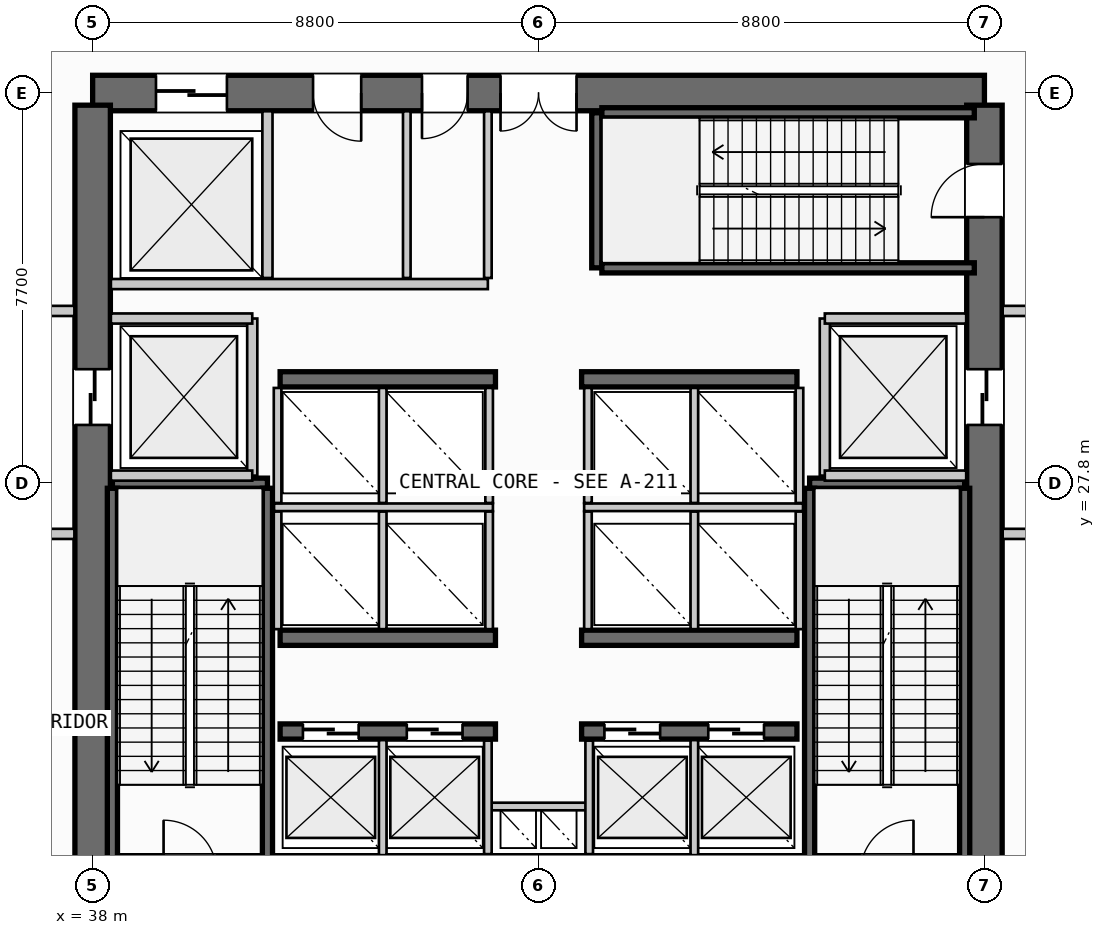
"""IFC4 building model, lengths in metres.
Left out: names, types, materials, properties, quantities, classifications, styles, units other than length and angle.
Written with IfcOpenShell. Run it as: python <this file> out.ifc"""

import sys

from ifc_helpers import new_model, si_unit, direction, frame, frame_2d, origin, place, context, subcontext, project, spatial, rectangle, extrude, source, transform, mapped, element, fill, save


model = new_model("IFC4")
c1 = context("Model", 3, precision=1e-05, world=origin(), true_north=direction((0.0, 1.0)))
c2 = subcontext(c1, "Body", "Model", "MODEL_VIEW")
j1 = project(units=[si_unit("LENGTHUNIT", "METRE"), si_unit("PLANEANGLEUNIT", "RADIAN")], contexts=[c1])
p1 = place(None, origin())
s1 = spatial("IfcSite", under=j1, at=p1, CompositionType="ELEMENT")
p2 = place(p1, origin())
s2 = spatial("IfcBuilding", under=s1, at=p2, CompositionType="ELEMENT")
p3 = place(p2, frame((0.0, 0.0, 75.2)))
s3 = spatial("IfcBuildingStorey", under=s2, at=p3, CompositionType="ELEMENT", Elevation=75.2)
p4 = place(p3, frame((38.0, 20.1, 0.0), z_axis=(0.0, 0.0, 1.0), x_axis=(1.0, 0.0, 0.0)))
e1 = element("IfcWall", 1, at=p4, inside=s3, PredefinedType="SHEAR", context=c2, shape_type="SweptSolid", body=[
    extrude(rectangle(XDim=17.6, YDim=0.7, at=frame_2d((8.8, 0.0))), origin(), (0.0, 0.0, 1.0), 4.89),
])
p5 = place(p4, frame((1.4, 0.0, 0.0)))
e2 = element("IfcOpeningElement", 2, at=p5, cuts=e1, PredefinedType="OPENING", context=c2, shape_type="SweptSolid", body=[
    extrude(rectangle(XDim=1.05, YDim=2.15, at=frame_2d((0.525, 1.075))), frame((0.0, 0.36, 0.0), z_axis=(0.0, -1.0, 0.0), x_axis=(1.0, 0.0, 0.0)), (0.0, 0.0, 1.0), 0.72),
])
p6 = place(p4, frame((15.15, 0.0, 0.0)))
e3 = element("IfcOpeningElement", 3, at=p6, cuts=e1, PredefinedType="OPENING", context=c2, shape_type="SweptSolid", body=[
    extrude(rectangle(XDim=1.05, YDim=2.15, at=frame_2d((0.525, 1.075))), frame((0.0, 0.36, 0.0), z_axis=(0.0, -1.0, 0.0), x_axis=(1.0, 0.0, 0.0)), (0.0, 0.0, 1.0), 0.72),
])
p7 = place(p3, frame((55.6, 35.5, 0.0), z_axis=(0.0, 0.0, 1.0), x_axis=(-1.0, 0.0, 0.0)))
e4 = element("IfcWall", 4, at=p7, inside=s3, PredefinedType="SHEAR", context=c2, shape_type="SweptSolid", body=[
    extrude(rectangle(XDim=17.6, YDim=0.7, at=frame_2d((8.8, 0.0))), origin(), (0.0, 0.0, 1.0), 4.89),
])
p8 = place(p7, frame((8.05, 0.0, 0.0)))
e5 = element("IfcOpeningElement", 5, at=p8, cuts=e4, PredefinedType="OPENING", context=c2, shape_type="SweptSolid", body=[
    extrude(rectangle(XDim=1.5, YDim=2.2, at=frame_2d((0.75, 1.1))), frame((0.0, 0.36, 0.0), z_axis=(0.0, -1.0, 0.0), x_axis=(1.0, 0.0, 0.0)), (0.0, 0.0, 1.0), 0.72),
])
p9 = place(p7, frame((14.95, 0.0, 0.0)))
e6 = element("IfcOpeningElement", 6, at=p9, cuts=e4, PredefinedType="OPENING", context=c2, shape_type="SweptSolid", body=[
    extrude(rectangle(XDim=1.4, YDim=2.3, at=frame_2d((0.7, 1.15))), frame((0.0, 0.36, 0.0), z_axis=(0.0, -1.0, 0.0), x_axis=(1.0, 0.0, 0.0)), (0.0, 0.0, 1.0), 0.72),
])
p10 = place(p7, frame((12.3, 0.0, 0.0)))
e7 = element("IfcOpeningElement", 7, at=p10, cuts=e4, PredefinedType="OPENING", context=c2, shape_type="SweptSolid", body=[
    extrude(rectangle(XDim=0.95, YDim=2.15, at=frame_2d((0.475, 1.075))), frame((0.0, 0.36, 0.0), z_axis=(0.0, -1.0, 0.0), x_axis=(1.0, 0.0, 0.0)), (0.0, 0.0, 1.0), 0.72),
])
p11 = place(p7, frame((10.2, 0.0, 0.0)))
e8 = element("IfcOpeningElement", 8, at=p11, cuts=e4, PredefinedType="OPENING", context=c2, shape_type="SweptSolid", body=[
    extrude(rectangle(XDim=0.9, YDim=2.15, at=frame_2d((0.45, 1.075))), frame((0.0, 0.36, 0.0), z_axis=(0.0, -1.0, 0.0), x_axis=(1.0, 0.0, 0.0)), (0.0, 0.0, 1.0), 0.72),
])
p12 = place(p3, frame((38.0, 35.26, 0.0), z_axis=(0.0, 0.0, 1.0), x_axis=(0.0, -1.0, 0.0)))
e9 = element("IfcWall", 9, at=p12, inside=s3, PredefinedType="SHEAR", context=c2, shape_type="SweptSolid", body=[
    extrude(rectangle(XDim=14.92, YDim=0.7, at=frame_2d((7.46, 0.0))), origin(), (0.0, 0.0, 1.0), 4.89),
])
p13 = place(p12, frame((5.21, 0.0, 0.0)))
e10 = element("IfcOpeningElement", 10, at=p13, cuts=e9, PredefinedType="OPENING", context=c2, shape_type="SweptSolid", body=[
    extrude(rectangle(XDim=1.1, YDim=2.2, at=frame_2d((0.55, 1.1))), frame((0.0, 0.36, 0.0), z_axis=(0.0, -1.0, 0.0), x_axis=(1.0, 0.0, 0.0)), (0.0, 0.0, 1.0), 0.72),
])
p14 = place(p3, frame((55.6, 20.34, 0.0), z_axis=(0.0, 0.0, 1.0), x_axis=(0.0, 1.0, 0.0)))
e11 = element("IfcWall", 11, at=p14, inside=s3, PredefinedType="SHEAR", context=c2, shape_type="SweptSolid", body=[
    extrude(rectangle(XDim=14.92, YDim=0.7, at=frame_2d((7.46, 0.0))), origin(), (0.0, 0.0, 1.0), 4.89),
])
p15 = place(p14, frame((12.71, 0.0, 0.0)))
e12 = element("IfcOpeningElement", 12, at=p15, cuts=e11, PredefinedType="OPENING", context=c2, shape_type="SweptSolid", body=[
    extrude(rectangle(XDim=1.05, YDim=2.15, at=frame_2d((0.525, 1.075))), frame((0.0, 0.36, 0.0), z_axis=(0.0, -1.0, 0.0), x_axis=(1.0, 0.0, 0.0)), (0.0, 0.0, 1.0), 0.72),
])
p16 = place(p14, frame((8.61, 0.0, 0.0)))
e13 = element("IfcOpeningElement", 13, at=p16, cuts=e11, PredefinedType="OPENING", context=c2, shape_type="SweptSolid", body=[
    extrude(rectangle(XDim=1.1, YDim=2.2, at=frame_2d((0.55, 1.1))), frame((0.0, 0.36, 0.0), z_axis=(0.0, -1.0, 0.0), x_axis=(1.0, 0.0, 0.0)), (0.0, 0.0, 1.0), 0.72),
])
p17 = place(p3, frame((41.7, 22.9, 0.0), z_axis=(0.0, 0.0, 1.0), x_axis=(1.0, 0.0, 0.0)))
e14 = element("IfcWall", 14, at=p17, inside=s3, PredefinedType="SHEAR", context=c2, shape_type="SweptSolid", body=[
    extrude(rectangle(XDim=4.25, YDim=0.3, at=frame_2d((2.125, 0.0))), origin(), (0.0, 0.0, 1.0), 4.89),
])
p18 = place(p17, frame((0.45, 0.0, 0.0)))
e15 = element("IfcOpeningElement", 15, at=p18, cuts=e14, PredefinedType="OPENING", context=c2, shape_type="SweptSolid", body=[
    extrude(rectangle(XDim=1.1, YDim=2.2, at=frame_2d((0.55, 1.1))), frame((0.0, 0.16, 0.0), z_axis=(0.0, -1.0, 0.0), x_axis=(1.0, 0.0, 0.0)), (0.0, 0.0, 1.0), 0.32),
])
p19 = place(p17, frame((2.5, 0.0, 0.0)))
e16 = element("IfcOpeningElement", 16, at=p19, cuts=e14, PredefinedType="OPENING", context=c2, shape_type="SweptSolid", body=[
    extrude(rectangle(XDim=1.1, YDim=2.2, at=frame_2d((0.55, 1.1))), frame((0.0, 0.16, 0.0), z_axis=(0.0, -1.0, 0.0), x_axis=(1.0, 0.0, 0.0)), (0.0, 0.0, 1.0), 0.32),
])
p20 = place(p3, frame((47.65, 22.9, 0.0), z_axis=(0.0, 0.0, 1.0), x_axis=(1.0, 0.0, 0.0)))
e17 = element("IfcWall", 17, at=p20, inside=s3, PredefinedType="SHEAR", context=c2, shape_type="SweptSolid", body=[
    extrude(rectangle(XDim=4.25, YDim=0.3, at=frame_2d((2.125, 0.0))), origin(), (0.0, 0.0, 1.0), 4.89),
])
p21 = place(p20, frame((0.45, 0.0, 0.0)))
e18 = element("IfcOpeningElement", 18, at=p21, cuts=e17, PredefinedType="OPENING", context=c2, shape_type="SweptSolid", body=[
    extrude(rectangle(XDim=1.1, YDim=2.2, at=frame_2d((0.55, 1.1))), frame((0.0, 0.16, 0.0), z_axis=(0.0, -1.0, 0.0), x_axis=(1.0, 0.0, 0.0)), (0.0, 0.0, 1.0), 0.32),
])
p22 = place(p20, frame((2.5, 0.0, 0.0)))
e19 = element("IfcOpeningElement", 19, at=p22, cuts=e17, PredefinedType="OPENING", context=c2, shape_type="SweptSolid", body=[
    extrude(rectangle(XDim=1.1, YDim=2.2, at=frame_2d((0.55, 1.1))), frame((0.0, 0.16, 0.0), z_axis=(0.0, -1.0, 0.0), x_axis=(1.0, 0.0, 0.0)), (0.0, 0.0, 1.0), 0.32),
])
for number, where, z_axis, x_axis in (
    (20, (41.7, 24.75, 0.0), (0.0, 0.0, 1.0), (1.0, 0.0, 0.0)),
    (21, (47.65, 24.75, 0.0), (0.0, 0.0, 1.0), (1.0, 0.0, 0.0)),
    (22, (41.7, 29.85, 0.0), (0.0, 0.0, 1.0), (1.0, 0.0, 0.0)),
    (23, (47.65, 29.85, 0.0), (0.0, 0.0, 1.0), (1.0, 0.0, 0.0)),
):
    element("IfcWall", number, at=place(p3, frame(where, z_axis=z_axis, x_axis=x_axis)), inside=s3, PredefinedType="SHEAR", context=c2, shape_type="SweptSolid", body=[
        extrude(rectangle(XDim=4.25, YDim=0.3, at=frame_2d((2.125, 0.0))), origin(), (0.0, 0.0, 1.0), 4.89),
    ])
p23 = place(p3, frame((38.39, 27.8, 0.0), z_axis=(0.0, 0.0, 1.0), x_axis=(1.0, 0.0, 0.0)))
e24 = element("IfcWall", 24, at=p23, inside=s3, PredefinedType="SHEAR", context=c2, shape_type="SweptSolid", body=[
    extrude(rectangle(XDim=3.06, YDim=0.2, at=frame_2d((1.53, 0.0))), origin(), (0.0, 0.0, 1.0), 4.89),
])
for number, where, z_axis, x_axis in (
    (25, (41.45, 27.7, 0.0), (0.0, 0.0, 1.0), (0.0, -1.0, 0.0)),
    (26, (38.39, 20.35, 0.0), (0.0, 0.0, 1.0), (0.0, 1.0, 0.0)),
):
    element("IfcWall", number, at=place(p3, frame(where, z_axis=z_axis, x_axis=x_axis)), inside=s3, PredefinedType="SHEAR", context=c2, shape_type="SweptSolid", body=[
        extrude(rectangle(XDim=7.35, YDim=0.2, at=frame_2d((3.675, 0.0))), origin(), (0.0, 0.0, 1.0), 4.89),
    ])
p24 = place(p3, frame((52.15, 27.8, 0.0), z_axis=(0.0, 0.0, 1.0), x_axis=(1.0, 0.0, 0.0)))
e27 = element("IfcWall", 27, at=p24, inside=s3, PredefinedType="SHEAR", context=c2, shape_type="SweptSolid", body=[
    extrude(rectangle(XDim=3.06, YDim=0.2, at=frame_2d((1.53, 0.0))), origin(), (0.0, 0.0, 1.0), 4.89),
])
for number, where, z_axis, x_axis in (
    (28, (55.21, 27.7, 0.0), (0.0, 0.0, 1.0), (0.0, -1.0, 0.0)),
    (29, (52.15, 20.35, 0.0), (0.0, 0.0, 1.0), (0.0, 1.0, 0.0)),
):
    element("IfcWall", number, at=place(p3, frame(where, z_axis=z_axis, x_axis=x_axis)), inside=s3, PredefinedType="SHEAR", context=c2, shape_type="SweptSolid", body=[
        extrude(rectangle(XDim=7.35, YDim=0.2, at=frame_2d((3.675, 0.0))), origin(), (0.0, 0.0, 1.0), 4.89),
    ])
p25 = place(p3, frame((47.95, 32.05, 0.0), z_axis=(0.0, 0.0, 1.0), x_axis=(0.0, 1.0, 0.0)))
e30 = element("IfcWall", 30, at=p25, inside=s3, PredefinedType="SHEAR", context=c2, shape_type="SweptSolid", body=[
    extrude(rectangle(XDim=3.06, YDim=0.2, at=frame_2d((1.53, 0.0))), origin(), (0.0, 0.0, 1.0), 4.89),
])
for number, where, z_axis, x_axis in (
    (31, (48.05, 35.11, 0.0), (0.0, 0.0, 1.0), (1.0, 0.0, 0.0)),
    (32, (55.4, 32.05, 0.0), (0.0, 0.0, 1.0), (-1.0, 0.0, 0.0)),
):
    element("IfcWall", number, at=place(p3, frame(where, z_axis=z_axis, x_axis=x_axis)), inside=s3, PredefinedType="SHEAR", context=c2, shape_type="SweptSolid", body=[
        extrude(rectangle(XDim=7.35, YDim=0.2, at=frame_2d((3.675, 0.0))), origin(), (0.0, 0.0, 1.0), 4.89),
    ])
p26 = place(p3, frame((45.8, 21.42, 0.0), z_axis=(0.0, 0.0, 1.0), x_axis=(1.0, 0.0, 0.0)))
e33 = element("IfcWall", 33, at=p26, inside=s3, PredefinedType="PARTITIONING", context=c2, shape_type="SweptSolid", body=[
    extrude(rectangle(XDim=2.0, YDim=0.15, at=frame_2d((1.0, 0.0))), origin(), (0.0, 0.0, 1.0), 4.265),
])
for number, where, z_axis, x_axis in (
    (34, (45.8, 20.48, 0.0), (0.0, 0.0, 1.0), (0.0, 1.0, 0.0)),
    (35, (47.8, 20.48, 0.0), (0.0, 0.0, 1.0), (0.0, 1.0, 0.0)),
):
    element("IfcWall", number, at=place(p3, frame(where, z_axis=z_axis, x_axis=x_axis)), inside=s3, PredefinedType="PARTITIONING", context=c2, shape_type="SweptSolid", body=[
        extrude(rectangle(XDim=2.24, YDim=0.15, at=frame_2d((1.12, 0.0))), origin(), (0.0, 0.0, 1.0), 4.265),
    ])
p27 = place(p3, frame((41.15, 27.95, 0.0), z_axis=(0.0, 0.0, 1.0), x_axis=(0.0, 1.0, 0.0)))
e36 = element("IfcWall", 36, at=p27, inside=s3, PredefinedType="PARTITIONING", context=c2, shape_type="SweptSolid", body=[
    extrude(rectangle(XDim=3.1, YDim=0.2, at=frame_2d((1.55, 0.0))), origin(), (0.0, 0.0, 1.0), 4.265),
])
for number, where, z_axis, x_axis in (
    (37, (38.36, 27.95, 0.0), (0.0, 0.0, 1.0), (1.0, 0.0, 0.0)),
    (38, (38.36, 31.05, 0.0), (0.0, 0.0, 1.0), (1.0, 0.0, 0.0)),
):
    element("IfcWall", number, at=place(p3, frame(where, z_axis=z_axis, x_axis=x_axis)), inside=s3, PredefinedType="PARTITIONING", context=c2, shape_type="SweptSolid", body=[
        extrude(rectangle(XDim=2.79, YDim=0.2, at=frame_2d((1.395, 0.0))), origin(), (0.0, 0.0, 1.0), 4.265),
    ])
for number, where, z_axis, x_axis in (
    (39, (34.5, 26.8, 0.0), (0.0, 0.0, 1.0), (1.0, 0.0, 0.0)),
    (40, (34.5, 31.2, 0.0), (0.0, 0.0, 1.0), (1.0, 0.0, 0.0)),
):
    element("IfcWall", number, at=place(p3, frame(where, z_axis=z_axis, x_axis=x_axis)), inside=s3, PredefinedType="PARTITIONING", context=c2, shape_type="SweptSolid", body=[
        extrude(rectangle(XDim=3.14, YDim=0.2, at=frame_2d((1.57, 0.0))), origin(), (0.0, 0.0, 1.0), 4.265),
    ])
p28 = place(p3, frame((52.45, 27.95, 0.0), z_axis=(0.0, 0.0, 1.0), x_axis=(0.0, 1.0, 0.0)))
e41 = element("IfcWall", 41, at=p28, inside=s3, PredefinedType="PARTITIONING", context=c2, shape_type="SweptSolid", body=[
    extrude(rectangle(XDim=3.1, YDim=0.2, at=frame_2d((1.55, 0.0))), origin(), (0.0, 0.0, 1.0), 4.265),
])
for number, where, z_axis, x_axis in (
    (42, (52.45, 27.95, 0.0), (0.0, 0.0, 1.0), (1.0, 0.0, 0.0)),
    (43, (52.45, 31.05, 0.0), (0.0, 0.0, 1.0), (1.0, 0.0, 0.0)),
):
    element("IfcWall", number, at=place(p3, frame(where, z_axis=z_axis, x_axis=x_axis)), inside=s3, PredefinedType="PARTITIONING", context=c2, shape_type="SweptSolid", body=[
        extrude(rectangle(XDim=2.79, YDim=0.2, at=frame_2d((1.395, 0.0))), origin(), (0.0, 0.0, 1.0), 4.265),
    ])
for number, where, z_axis, x_axis in (
    (44, (55.96, 26.8, 0.0), (0.0, 0.0, 1.0), (1.0, 0.0, 0.0)),
    (45, (55.96, 31.2, 0.0), (0.0, 0.0, 1.0), (1.0, 0.0, 0.0)),
):
    element("IfcWall", number, at=place(p3, frame(where, z_axis=z_axis, x_axis=x_axis)), inside=s3, PredefinedType="PARTITIONING", context=c2, shape_type="SweptSolid", body=[
        extrude(rectangle(XDim=3.14, YDim=0.2, at=frame_2d((1.57, 0.0))), origin(), (0.0, 0.0, 1.0), 4.265),
    ])
for number, where, z_axis, x_axis in (
    (46, (43.725, 20.46, 0.0), (0.0, 0.0, 1.0), (0.0, 1.0, 0.0)),
    (47, (49.875, 20.46, 0.0), (0.0, 0.0, 1.0), (0.0, 1.0, 0.0)),
):
    element("IfcWall", number, at=place(p3, frame(where, z_axis=z_axis, x_axis=x_axis)), inside=s3, PredefinedType="PARTITIONING", context=c2, shape_type="SweptSolid", body=[
        extrude(rectangle(XDim=2.27, YDim=0.15, at=frame_2d((1.135, 0.0))), origin(), (0.0, 0.0, 1.0), 4.265),
    ])
p29 = place(p3, frame((41.58, 27.325, 0.0), z_axis=(0.0, 0.0, 1.0), x_axis=(1.0, 0.0, 0.0)))
e48 = element("IfcWall", 48, at=p29, inside=s3, PredefinedType="PARTITIONING", context=c2, shape_type="SweptSolid", body=[
    extrude(rectangle(XDim=4.32, YDim=0.15, at=frame_2d((2.16, 0.0))), origin(), (0.0, 0.0, 1.0), 4.265),
])
p30 = place(p3, frame((47.7, 27.325, 0.0), z_axis=(0.0, 0.0, 1.0), x_axis=(1.0, 0.0, 0.0)))
e49 = element("IfcWall", 49, at=p30, inside=s3, PredefinedType="PARTITIONING", context=c2, shape_type="SweptSolid", body=[
    extrude(rectangle(XDim=4.32, YDim=0.15, at=frame_2d((2.16, 0.0))), origin(), (0.0, 0.0, 1.0), 4.265),
])
for number, where, z_axis, x_axis in (
    (50, (41.65, 24.92, 0.0), (0.0, 0.0, 1.0), (0.0, 1.0, 0.0)),
    (51, (43.725, 24.92, 0.0), (0.0, 0.0, 1.0), (0.0, 1.0, 0.0)),
    (52, (45.825, 24.92, 0.0), (0.0, 0.0, 1.0), (0.0, 1.0, 0.0)),
    (53, (47.775, 24.92, 0.0), (0.0, 0.0, 1.0), (0.0, 1.0, 0.0)),
    (54, (49.875, 24.92, 0.0), (0.0, 0.0, 1.0), (0.0, 1.0, 0.0)),
    (55, (51.95, 24.92, 0.0), (0.0, 0.0, 1.0), (0.0, 1.0, 0.0)),
):
    element("IfcWall", number, at=place(p3, frame(where, z_axis=z_axis, x_axis=x_axis)), inside=s3, PredefinedType="PARTITIONING", context=c2, shape_type="SweptSolid", body=[
        extrude(rectangle(XDim=2.32, YDim=0.15, at=frame_2d((1.16, 0.0))), origin(), (0.0, 0.0, 1.0), 4.265),
    ])
for number, where, z_axis, x_axis in (
    (56, (41.65, 27.41, 0.0), (0.0, 0.0, 1.0), (0.0, 1.0, 0.0)),
    (57, (43.725, 27.41, 0.0), (0.0, 0.0, 1.0), (0.0, 1.0, 0.0)),
    (58, (45.825, 27.41, 0.0), (0.0, 0.0, 1.0), (0.0, 1.0, 0.0)),
    (59, (47.775, 27.41, 0.0), (0.0, 0.0, 1.0), (0.0, 1.0, 0.0)),
    (60, (49.875, 27.41, 0.0), (0.0, 0.0, 1.0), (0.0, 1.0, 0.0)),
    (61, (51.95, 27.41, 0.0), (0.0, 0.0, 1.0), (0.0, 1.0, 0.0)),
):
    element("IfcWall", number, at=place(p3, frame(where, z_axis=z_axis, x_axis=x_axis)), inside=s3, PredefinedType="PARTITIONING", context=c2, shape_type="SweptSolid", body=[
        extrude(rectangle(XDim=2.27, YDim=0.15, at=frame_2d((1.135, 0.0))), origin(), (0.0, 0.0, 1.0), 4.265),
    ])
p31 = place(p3, frame((41.45, 31.85, 0.0), z_axis=(0.0, 0.0, 1.0), x_axis=(0.0, 1.0, 0.0)))
e62 = element("IfcWall", 62, at=p31, inside=s3, PredefinedType="PARTITIONING", context=c2, shape_type="SweptSolid", body=[
    extrude(rectangle(XDim=3.29, YDim=0.2, at=frame_2d((1.645, 0.0))), origin(), (0.0, 0.0, 1.0), 4.265),
])
p32 = place(p3, frame((38.36, 31.73, 0.0), z_axis=(0.0, 0.0, 1.0), x_axis=(1.0, 0.0, 0.0)))
e63 = element("IfcWall", 63, at=p32, inside=s3, PredefinedType="PARTITIONING", context=c2, shape_type="SweptSolid", body=[
    extrude(rectangle(XDim=7.44, YDim=0.2, at=frame_2d((3.72, 0.0))), origin(), (0.0, 0.0, 1.0), 4.265),
])
p33 = place(p3, frame((45.8, 31.85, 0.0), z_axis=(0.0, 0.0, 1.0), x_axis=(0.0, 1.0, 0.0)))
e64 = element("IfcWall", 64, at=p33, inside=s3, PredefinedType="PARTITIONING", context=c2, shape_type="SweptSolid", body=[
    extrude(rectangle(XDim=3.29, YDim=0.15, at=frame_2d((1.645, 0.0))), origin(), (0.0, 0.0, 1.0), 4.265),
])
p34 = place(p3, frame((44.2, 31.85, 0.0), z_axis=(0.0, 0.0, 1.0), x_axis=(0.0, 1.0, 0.0)))
e65 = element("IfcWall", 65, at=p34, inside=s3, PredefinedType="PLUMBINGWALL", context=c2, shape_type="SweptSolid", body=[
    extrude(rectangle(XDim=3.29, YDim=0.15, at=frame_2d((1.645, 0.0))), origin(), (0.0, 0.0, 1.0), 4.265),
])
m1 = source(origin(), c2, "Body", "SweptSolid", [
    extrude(rectangle(XDim=1.05, YDim=2.15, at=frame_2d((0.525, 1.075))), frame((0.0, 0.025, 0.0), z_axis=(0.0, -1.0, 0.0), x_axis=(1.0, 0.0, 0.0)), (0.0, 0.0, 1.0), 0.05),
])
p35 = place(p15, origin())
e66 = element("IfcDoor", 66, at=p35, inside=s3, OperationType="SINGLE_SWING_LEFT", PredefinedType="DOOR", context=c2, shape_type="MappedRepresentation", body=[
    mapped(m1, transform((0.0, 0.0, 0.0), scale=1.0)),
])
fill(e12, e66)
m2 = source(origin(), c2, "Body", "SweptSolid", [
    extrude(rectangle(XDim=1.5, YDim=2.2, at=frame_2d((0.75, 1.1))), frame((0.0, 0.025, 0.0), z_axis=(0.0, -1.0, 0.0), x_axis=(1.0, 0.0, 0.0)), (0.0, 0.0, 1.0), 0.05),
])
p36 = place(p8, origin())
e67 = element("IfcDoor", 67, at=p36, inside=s3, OperationType="DOUBLE_DOOR_SINGLE_SWING", PredefinedType="DOOR", context=c2, shape_type="MappedRepresentation", body=[
    mapped(m2, transform((0.0, 0.0, 0.0), scale=1.0)),
])
fill(e5, e67)
m3 = source(origin(), c2, "Body", "SweptSolid", [
    extrude(rectangle(XDim=1.1, YDim=2.2, at=frame_2d((0.55, 1.1))), frame((0.0, 0.025, 0.0), z_axis=(0.0, -1.0, 0.0), x_axis=(1.0, 0.0, 0.0)), (0.0, 0.0, 1.0), 0.05),
])
p37 = place(p13, origin())
e68 = element("IfcDoor", 68, at=p37, inside=s3, OperationType="SLIDING_TO_LEFT", PredefinedType="DOOR", context=c2, shape_type="MappedRepresentation", body=[
    mapped(m3, transform((0.0, 0.0, 0.0), scale=1.0)),
])
fill(e10, e68)
p38 = place(p16, origin())
e69 = element("IfcDoor", 69, at=p38, inside=s3, OperationType="SLIDING_TO_RIGHT", PredefinedType="DOOR", context=c2, shape_type="MappedRepresentation", body=[
    mapped(m3, transform((0.0, 0.0, 0.0), scale=1.0)),
])
fill(e13, e69)
p39 = place(p18, origin())
e70 = element("IfcDoor", 70, at=p39, inside=s3, OperationType="SLIDING_TO_LEFT", PredefinedType="DOOR", context=c2, shape_type="MappedRepresentation", body=[
    mapped(m3, transform((0.0, 0.0, 0.0), scale=1.0)),
])
fill(e15, e70)
p40 = place(p19, origin())
e71 = element("IfcDoor", 71, at=p40, inside=s3, OperationType="SLIDING_TO_LEFT", PredefinedType="DOOR", context=c2, shape_type="MappedRepresentation", body=[
    mapped(m3, transform((0.0, 0.0, 0.0), scale=1.0)),
])
fill(e16, e71)
p41 = place(p21, origin())
e72 = element("IfcDoor", 72, at=p41, inside=s3, OperationType="SLIDING_TO_LEFT", PredefinedType="DOOR", context=c2, shape_type="MappedRepresentation", body=[
    mapped(m3, transform((0.0, 0.0, 0.0), scale=1.0)),
])
fill(e18, e72)
p42 = place(p22, origin())
e73 = element("IfcDoor", 73, at=p42, inside=s3, OperationType="SLIDING_TO_LEFT", PredefinedType="DOOR", context=c2, shape_type="MappedRepresentation", body=[
    mapped(m3, transform((0.0, 0.0, 0.0), scale=1.0)),
])
fill(e19, e73)
m4 = source(origin(), c2, "Body", "SweptSolid", [
    extrude(rectangle(XDim=1.4, YDim=2.3, at=frame_2d((0.7, 1.15))), frame((0.0, 0.025, 0.0), z_axis=(0.0, -1.0, 0.0), x_axis=(1.0, 0.0, 0.0)), (0.0, 0.0, 1.0), 0.05),
])
p43 = place(p9, origin())
e74 = element("IfcDoor", 74, at=p43, inside=s3, OperationType="SLIDING_TO_RIGHT", PredefinedType="DOOR", context=c2, shape_type="MappedRepresentation", body=[
    mapped(m4, transform((0.0, 0.0, 0.0), scale=1.0)),
])
fill(e6, e74)
m5 = source(origin(), c2, "Body", "SweptSolid", [
    extrude(rectangle(XDim=0.95, YDim=2.15, at=frame_2d((0.475, 1.075))), frame((0.0, 0.025, 0.0), z_axis=(0.0, -1.0, 0.0), x_axis=(1.0, 0.0, 0.0)), (0.0, 0.0, 1.0), 0.05),
])
p44 = place(p10, origin())
e75 = element("IfcDoor", 75, at=p44, inside=s3, OperationType="SINGLE_SWING_LEFT", PredefinedType="DOOR", context=c2, shape_type="MappedRepresentation", body=[
    mapped(m5, transform((0.0, 0.0, 0.0), scale=1.0)),
])
fill(e7, e75)
m6 = source(origin(), c2, "Body", "SweptSolid", [
    extrude(rectangle(XDim=0.9, YDim=2.15, at=frame_2d((0.45, 1.075))), frame((0.0, 0.025, 0.0), z_axis=(0.0, -1.0, 0.0), x_axis=(1.0, 0.0, 0.0)), (0.0, 0.0, 1.0), 0.05),
])
p45 = place(p11, origin())
e76 = element("IfcDoor", 76, at=p45, inside=s3, OperationType="SINGLE_SWING_RIGHT", PredefinedType="DOOR", context=c2, shape_type="MappedRepresentation", body=[
    mapped(m6, transform((0.0, 0.0, 0.0), scale=1.0)),
])
fill(e8, e76)
save(model, sys.argv[1])
